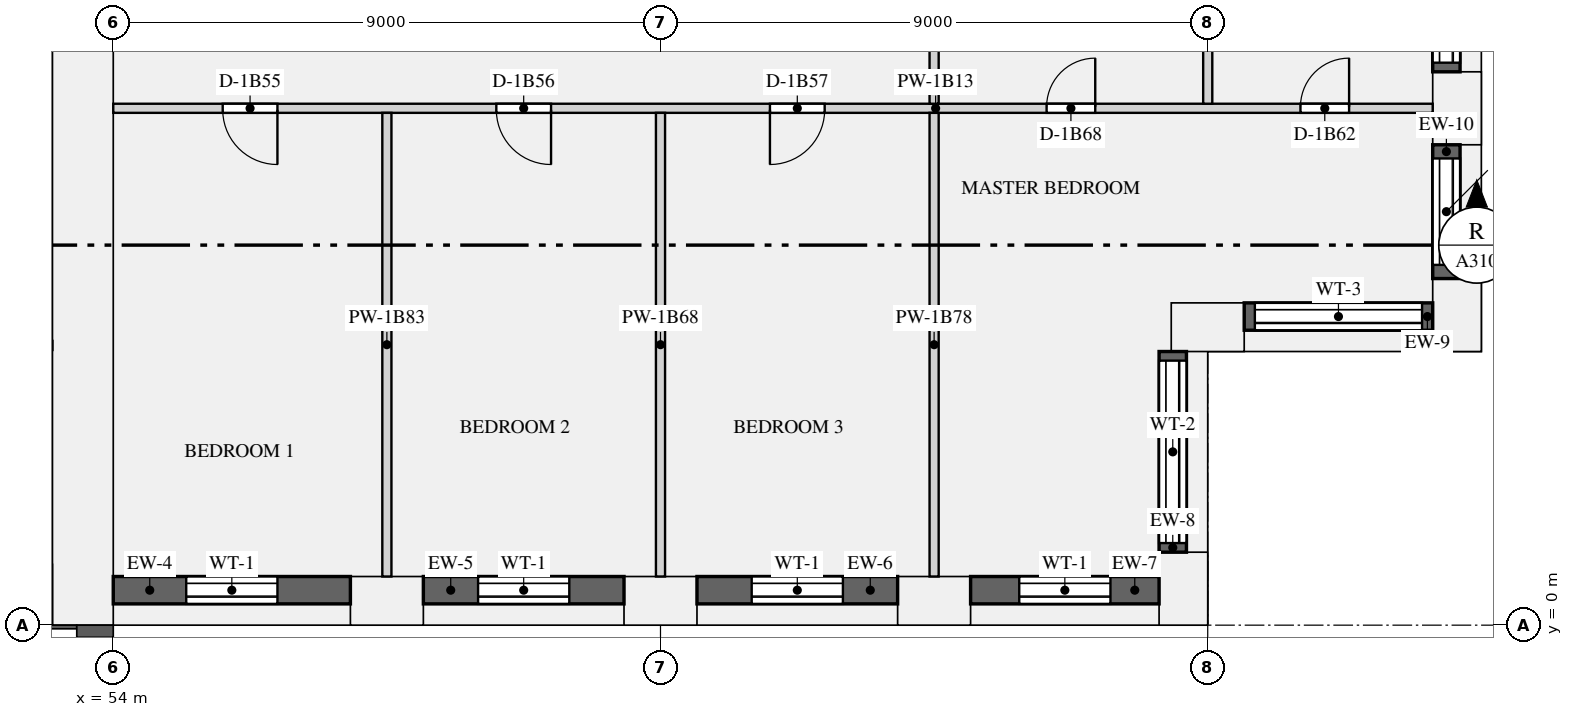
"""IFC4 building model, lengths in metres.
Left out: names, types, materials, properties, quantities, classifications, styles, units other than length and angle.
Written with IfcOpenShell. Run it as: python <this file> out.ifc"""

import sys

from ifc_helpers import new_model, si_unit, direction, frame, frame_2d, origin, origin_2d, place, context, subcontext, project, spatial, rectangle, extrude, element, fill, save


model = new_model("IFC4")
c1 = context("Model", 3, precision=1e-05, world=origin(), true_north=direction((0.0, 1.0)))
c2 = subcontext(c1, "Body", "Model", "MODEL_VIEW")
j1 = project(units=[si_unit("LENGTHUNIT", "METRE"), si_unit("PLANEANGLEUNIT", "RADIAN")], contexts=[c1])
p1 = place(None, origin())
s1 = spatial("IfcSite", under=j1, at=p1, CompositionType="ELEMENT")
p2 = place(p1, origin())
s2 = spatial("IfcBuilding", under=s1, at=p2, CompositionType="ELEMENT")
p3 = place(p2, frame((0.0, 0.0, 28.95)))
s3 = spatial("IfcBuildingStorey", under=s2, at=p3, CompositionType="ELEMENT", Elevation=28.95)
for number, where, z_axis, x_axis in (
    (1, (58.5, 0.4, 0.0), (0.0, 0.0, 1.0), (1.0, 0.0, 0.0)),
    (2, (63.0, 0.4, 0.0), (0.0, 0.0, 1.0), (1.0, 0.0, 0.0)),
    (3, (67.5, 0.4, 0.0), (0.0, 0.0, 1.0), (1.0, 0.0, 0.0)),
    (4, (71.6, 0.6, 0.0), (0.0, 0.0, 1.0), (0.0, 1.0, 0.0)),
    (5, (72.0, 4.9, 0.0), (0.0, 0.0, 1.0), (1.0, 0.0, 0.0)),
    (6, (76.1, 5.1, 0.0), (0.0, 0.0, 1.0), (0.0, 1.0, 0.0)),
    (7, (76.1, 8.5, 0.0), (0.0, 0.0, 1.0), (0.0, 1.0, 0.0)),
):
    element("IfcColumn", number, at=place(p3, frame(where, z_axis=z_axis, x_axis=x_axis)), inside=s3, PredefinedType="USERDEFINED", context=c2, shape_type="SweptSolid", body=[
        extrude(rectangle(XDim=1.2, YDim=0.8, at=origin_2d()), origin(), (0.0, 0.0, 1.0), 3.15),
    ])
p4 = place(p3, frame((53.5, 0.0, 0.0), z_axis=(0.0, 0.0, 1.0), x_axis=(0.0, 1.0, 0.0)))
e8 = element("IfcWall", 8, at=p4, inside=s3, PredefinedType="SHEAR", context=c2, shape_type="SweptSolid", body=[
    extrude(rectangle(XDim=12.5, YDim=1.0, at=frame_2d((6.25, 0.0))), origin(), (0.0, 0.0, 1.0), 3.15),
])
p5 = place(p3, frame((54.0, 0.575, 0.9), z_axis=(0.0, 0.0, 1.0), x_axis=(1.0, 0.0, 0.0)))
e9 = element("IfcWall", 9, at=p5, inside=s3, PredefinedType="SOLIDWALL", context=c2, shape_type="SweptSolid", body=[
    extrude(rectangle(XDim=3.9, YDim=0.45, at=frame_2d((1.95, 0.0))), origin(), (0.0, 0.0, 1.0), 1.93),
])
p6 = place(p5, frame((1.2, 0.0, 0.15)))
e10 = element("IfcOpeningElement", 10, at=p6, cuts=e9, PredefinedType="OPENING", context=c2, shape_type="SweptSolid", body=[
    extrude(rectangle(XDim=1.5, YDim=1.5, at=frame_2d((0.75, 0.75))), frame((0.0, 0.235, 0.0), z_axis=(0.0, -1.0, 0.0), x_axis=(1.0, 0.0, 0.0)), (0.0, 0.0, 1.0), 0.47),
])
p7 = place(p3, frame((59.1, 0.575, 0.9), z_axis=(0.0, 0.0, 1.0), x_axis=(1.0, 0.0, 0.0)))
e11 = element("IfcWall", 11, at=p7, inside=s3, PredefinedType="SOLIDWALL", context=c2, shape_type="SweptSolid", body=[
    extrude(rectangle(XDim=3.3, YDim=0.45, at=frame_2d((1.65, 0.0))), origin(), (0.0, 0.0, 1.0), 1.93),
])
p8 = place(p7, frame((0.9, 0.0, 0.15)))
e12 = element("IfcOpeningElement", 12, at=p8, cuts=e11, PredefinedType="OPENING", context=c2, shape_type="SweptSolid", body=[
    extrude(rectangle(XDim=1.5, YDim=1.5, at=frame_2d((0.75, 0.75))), frame((0.0, 0.235, 0.0), z_axis=(0.0, -1.0, 0.0), x_axis=(1.0, 0.0, 0.0)), (0.0, 0.0, 1.0), 0.47),
])
p9 = place(p3, frame((63.6, 0.575, 0.9), z_axis=(0.0, 0.0, 1.0), x_axis=(1.0, 0.0, 0.0)))
e13 = element("IfcWall", 13, at=p9, inside=s3, PredefinedType="SOLIDWALL", context=c2, shape_type="SweptSolid", body=[
    extrude(rectangle(XDim=3.3, YDim=0.45, at=frame_2d((1.65, 0.0))), origin(), (0.0, 0.0, 1.0), 1.93),
])
p10 = place(p9, frame((0.9, 0.0, 0.15)))
e14 = element("IfcOpeningElement", 14, at=p10, cuts=e13, PredefinedType="OPENING", context=c2, shape_type="SweptSolid", body=[
    extrude(rectangle(XDim=1.5, YDim=1.5, at=frame_2d((0.75, 0.75))), frame((0.0, 0.235, 0.0), z_axis=(0.0, -1.0, 0.0), x_axis=(1.0, 0.0, 0.0)), (0.0, 0.0, 1.0), 0.47),
])
p11 = place(p3, frame((68.1, 0.575, 0.9), z_axis=(0.0, 0.0, 1.0), x_axis=(1.0, 0.0, 0.0)))
e15 = element("IfcWall", 15, at=p11, inside=s3, PredefinedType="SOLIDWALL", context=c2, shape_type="SweptSolid", body=[
    extrude(rectangle(XDim=3.1, YDim=0.45, at=frame_2d((1.55, 0.0))), origin(), (0.0, 0.0, 1.0), 1.93),
])
p12 = place(p11, frame((0.8, 0.0, 0.15)))
e16 = element("IfcOpeningElement", 16, at=p12, cuts=e15, PredefinedType="OPENING", context=c2, shape_type="SweptSolid", body=[
    extrude(rectangle(XDim=1.5, YDim=1.5, at=frame_2d((0.75, 0.75))), frame((0.0, 0.235, 0.0), z_axis=(0.0, -1.0, 0.0), x_axis=(1.0, 0.0, 0.0)), (0.0, 0.0, 1.0), 0.47),
])
p13 = place(p3, frame((71.425, 1.2, 0.9), z_axis=(0.0, 0.0, 1.0), x_axis=(0.0, 1.0, 0.0)))
e17 = element("IfcWall", 17, at=p13, inside=s3, PredefinedType="SOLIDWALL", context=c2, shape_type="SweptSolid", body=[
    extrude(rectangle(XDim=3.3, YDim=0.45, at=frame_2d((1.65, 0.0))), origin(), (0.0, 0.0, 1.0), 1.93),
])
p14 = place(p13, frame((0.15, 0.0, 0.15)))
e18 = element("IfcOpeningElement", 18, at=p14, cuts=e17, PredefinedType="OPENING", context=c2, shape_type="SweptSolid", body=[
    extrude(rectangle(XDim=3.0, YDim=1.5, at=frame_2d((1.5, 0.75))), frame((0.0, 0.235, 0.0), z_axis=(0.0, -1.0, 0.0), x_axis=(1.0, 0.0, 0.0)), (0.0, 0.0, 1.0), 0.47),
])
p15 = place(p3, frame((72.6, 5.075, 0.9), z_axis=(0.0, 0.0, 1.0), x_axis=(1.0, 0.0, 0.0)))
e19 = element("IfcWall", 19, at=p15, inside=s3, PredefinedType="SOLIDWALL", context=c2, shape_type="SweptSolid", body=[
    extrude(rectangle(XDim=3.1, YDim=0.45, at=frame_2d((1.55, 0.0))), origin(), (0.0, 0.0, 1.0), 1.93),
])
p16 = place(p15, frame((0.175, 0.0, 0.15)))
e20 = element("IfcOpeningElement", 20, at=p16, cuts=e19, PredefinedType="OPENING", context=c2, shape_type="SweptSolid", body=[
    extrude(rectangle(XDim=2.75, YDim=1.5, at=frame_2d((1.375, 0.75))), frame((0.0, 0.235, 0.0), z_axis=(0.0, -1.0, 0.0), x_axis=(1.0, 0.0, 0.0)), (0.0, 0.0, 1.0), 0.47),
])
p17 = place(p3, frame((75.925, 5.7, 0.9), z_axis=(0.0, 0.0, 1.0), x_axis=(0.0, 1.0, 0.0)))
e21 = element("IfcWall", 21, at=p17, inside=s3, PredefinedType="SOLIDWALL", context=c2, shape_type="SweptSolid", body=[
    extrude(rectangle(XDim=2.2, YDim=0.45, at=frame_2d((1.1, 0.0))), origin(), (0.0, 0.0, 1.0), 1.93),
])
p18 = place(p17, frame((0.225, 0.0, 0.15)))
e22 = element("IfcOpeningElement", 22, at=p18, cuts=e21, PredefinedType="OPENING", context=c2, shape_type="SweptSolid", body=[
    extrude(rectangle(XDim=1.75, YDim=1.5, at=frame_2d((0.875, 0.75))), frame((0.0, 0.235, 0.0), z_axis=(0.0, -1.0, 0.0), x_axis=(1.0, 0.0, 0.0)), (0.0, 0.0, 1.0), 0.47),
])
p19 = place(p3, frame((75.925, 9.1, 0.9), z_axis=(0.0, 0.0, 1.0), x_axis=(0.0, 1.0, 0.0)))
e23 = element("IfcWall", 23, at=p19, inside=s3, PredefinedType="SOLIDWALL", context=c2, shape_type="SweptSolid", body=[
    extrude(rectangle(XDim=2.8, YDim=0.45, at=frame_2d((1.4, 0.0))), origin(), (0.0, 0.0, 1.0), 1.93),
])
p20 = place(p19, frame((0.15, 0.0, 0.15)))
e24 = element("IfcOpeningElement", 24, at=p20, cuts=e23, PredefinedType="OPENING", context=c2, shape_type="SweptSolid", body=[
    extrude(rectangle(XDim=2.5, YDim=1.5, at=frame_2d((1.25, 0.75))), frame((0.0, 0.235, 0.0), z_axis=(0.0, -1.0, 0.0), x_axis=(1.0, 0.0, 0.0)), (0.0, 0.0, 1.0), 0.47),
])
p21 = place(p3, frame((54.0, 8.5, 0.0), z_axis=(0.0, 0.0, 1.0), x_axis=(1.0, 0.0, 0.0)))
e25 = element("IfcWall", 25, at=p21, inside=s3, PredefinedType="PARTITIONING", context=c2, shape_type="SweptSolid", body=[
    extrude(rectangle(XDim=21.7, YDim=0.15, at=frame_2d((10.85, 0.0))), origin(), (0.0, 0.0, 1.0), 2.83),
])
p22 = place(p21, frame((1.8, 0.0, 0.0)))
e26 = element("IfcOpeningElement", 26, at=p22, cuts=e25, PredefinedType="OPENING", context=c2, shape_type="SweptSolid", body=[
    extrude(rectangle(XDim=0.9, YDim=2.1, at=frame_2d((0.45, 1.05))), frame((0.0, 0.085, 0.0), z_axis=(0.0, -1.0, 0.0), x_axis=(1.0, 0.0, 0.0)), (0.0, 0.0, 1.0), 0.17),
])
p23 = place(p21, frame((6.3, 0.0, 0.0)))
e27 = element("IfcOpeningElement", 27, at=p23, cuts=e25, PredefinedType="OPENING", context=c2, shape_type="SweptSolid", body=[
    extrude(rectangle(XDim=0.9, YDim=2.1, at=frame_2d((0.45, 1.05))), frame((0.0, 0.085, 0.0), z_axis=(0.0, -1.0, 0.0), x_axis=(1.0, 0.0, 0.0)), (0.0, 0.0, 1.0), 0.17),
])
p24 = place(p21, frame((10.8, 0.0, 0.0)))
e28 = element("IfcOpeningElement", 28, at=p24, cuts=e25, PredefinedType="OPENING", context=c2, shape_type="SweptSolid", body=[
    extrude(rectangle(XDim=0.9, YDim=2.1, at=frame_2d((0.45, 1.05))), frame((0.0, 0.085, 0.0), z_axis=(0.0, -1.0, 0.0), x_axis=(1.0, 0.0, 0.0)), (0.0, 0.0, 1.0), 0.17),
])
p25 = place(p21, frame((19.525, 0.0, 0.0)))
e29 = element("IfcOpeningElement", 29, at=p25, cuts=e25, PredefinedType="OPENING", context=c2, shape_type="SweptSolid", body=[
    extrude(rectangle(XDim=0.8, YDim=2.1, at=frame_2d((0.4, 1.05))), frame((0.0, 0.085, 0.0), z_axis=(0.0, -1.0, 0.0), x_axis=(1.0, 0.0, 0.0)), (0.0, 0.0, 1.0), 0.17),
])
p26 = place(p21, frame((15.35, 0.0, 0.0)))
e30 = element("IfcOpeningElement", 30, at=p26, cuts=e25, PredefinedType="OPENING", context=c2, shape_type="SweptSolid", body=[
    extrude(rectangle(XDim=0.8, YDim=2.1, at=frame_2d((0.4, 1.05))), frame((0.0, 0.085, 0.0), z_axis=(0.0, -1.0, 0.0), x_axis=(1.0, 0.0, 0.0)), (0.0, 0.0, 1.0), 0.17),
])
p27 = place(p3, frame((63.0, 0.8, 0.0), z_axis=(0.0, 0.0, 1.0), x_axis=(0.0, 1.0, 0.0)))
e31 = element("IfcWall", 31, at=p27, inside=s3, PredefinedType="PARTITIONING", context=c2, shape_type="SweptSolid", body=[
    extrude(rectangle(XDim=7.625, YDim=0.15, at=frame_2d((3.812, 0.0))), origin(), (0.0, 0.0, 1.0), 2.83),
])
p28 = place(p3, frame((72.0, 8.575, 0.0), z_axis=(0.0, 0.0, 1.0), x_axis=(0.0, 1.0, 0.0)))
e32 = element("IfcWall", 32, at=p28, inside=s3, PredefinedType="PARTITIONING", context=c2, shape_type="SweptSolid", body=[
    extrude(rectangle(XDim=3.85, YDim=0.15, at=frame_2d((1.925, 0.0))), origin(), (0.0, 0.0, 1.0), 2.83),
])
p29 = place(p28, frame((1.15, 0.0, 0.0)))
e33 = element("IfcOpeningElement", 33, at=p29, cuts=e32, PredefinedType="OPENING", context=c2, shape_type="SweptSolid", body=[
    extrude(rectangle(XDim=0.8, YDim=2.1, at=frame_2d((0.4, 1.05))), frame((0.0, 0.085, 0.0), z_axis=(0.0, -1.0, 0.0), x_axis=(1.0, 0.0, 0.0)), (0.0, 0.0, 1.0), 0.17),
])
p30 = place(p3, frame((67.5, 0.8, 0.0), z_axis=(0.0, 0.0, 1.0), x_axis=(0.0, 1.0, 0.0)))
e34 = element("IfcWall", 34, at=p30, inside=s3, PredefinedType="PARTITIONING", context=c2, shape_type="SweptSolid", body=[
    extrude(rectangle(XDim=7.625, YDim=0.15, at=frame_2d((3.812, 0.0))), origin(), (0.0, 0.0, 1.0), 2.83),
])
p31 = place(p3, frame((67.5, 8.575, 0.0), z_axis=(0.0, 0.0, 1.0), x_axis=(0.0, 1.0, 0.0)))
e35 = element("IfcWall", 35, at=p31, inside=s3, PredefinedType="PARTITIONING", context=c2, shape_type="SweptSolid", body=[
    extrude(rectangle(XDim=3.85, YDim=0.15, at=frame_2d((1.925, 0.0))), origin(), (0.0, 0.0, 1.0), 2.83),
])
p32 = place(p31, frame((1.525, 0.0, 0.0)))
e36 = element("IfcOpeningElement", 36, at=p32, cuts=e35, PredefinedType="OPENING", context=c2, shape_type="SweptSolid", body=[
    extrude(rectangle(XDim=0.8, YDim=2.1, at=frame_2d((0.4, 1.05))), frame((0.0, 0.085, 0.0), z_axis=(0.0, -1.0, 0.0), x_axis=(1.0, 0.0, 0.0)), (0.0, 0.0, 1.0), 0.17),
])
p33 = place(p3, frame((58.5, 0.8, 0.0), z_axis=(0.0, 0.0, 1.0), x_axis=(0.0, 1.0, 0.0)))
e37 = element("IfcWall", 37, at=p33, inside=s3, PredefinedType="PARTITIONING", context=c2, shape_type="SweptSolid", body=[
    extrude(rectangle(XDim=7.625, YDim=0.15, at=frame_2d((3.812, 0.0))), origin(), (0.0, 0.0, 1.0), 2.83),
])
p34 = place(p6, origin())
e38 = element("IfcWindow", 38, at=p34, inside=s3, PartitioningType="SINGLE_PANEL", PredefinedType="WINDOW", context=c2, shape_type="SweptSolid", body=[
    extrude(rectangle(XDim=1.5, YDim=1.5, at=frame_2d((0.75, 0.75))), frame((0.0, -0.065, 0.0), z_axis=(0.0, -1.0, 0.0), x_axis=(1.0, 0.0, 0.0)), (0.0, 0.0, 1.0), 0.06),
])
fill(e10, e38)
p35 = place(p8, origin())
e39 = element("IfcWindow", 39, at=p35, inside=s3, PartitioningType="SINGLE_PANEL", PredefinedType="WINDOW", context=c2, shape_type="SweptSolid", body=[
    extrude(rectangle(XDim=1.5, YDim=1.5, at=frame_2d((0.75, 0.75))), frame((0.0, -0.065, 0.0), z_axis=(0.0, -1.0, 0.0), x_axis=(1.0, 0.0, 0.0)), (0.0, 0.0, 1.0), 0.06),
])
fill(e12, e39)
p36 = place(p10, origin())
e40 = element("IfcWindow", 40, at=p36, inside=s3, PartitioningType="SINGLE_PANEL", PredefinedType="WINDOW", context=c2, shape_type="SweptSolid", body=[
    extrude(rectangle(XDim=1.5, YDim=1.5, at=frame_2d((0.75, 0.75))), frame((0.0, -0.065, 0.0), z_axis=(0.0, -1.0, 0.0), x_axis=(1.0, 0.0, 0.0)), (0.0, 0.0, 1.0), 0.06),
])
fill(e14, e40)
p37 = place(p12, origin())
e41 = element("IfcWindow", 41, at=p37, inside=s3, PartitioningType="SINGLE_PANEL", PredefinedType="WINDOW", context=c2, shape_type="SweptSolid", body=[
    extrude(rectangle(XDim=1.5, YDim=1.5, at=frame_2d((0.75, 0.75))), frame((0.0, -0.065, 0.0), z_axis=(0.0, -1.0, 0.0), x_axis=(1.0, 0.0, 0.0)), (0.0, 0.0, 1.0), 0.06),
])
fill(e16, e41)
p38 = place(p14, origin())
e42 = element("IfcWindow", 42, at=p38, inside=s3, PartitioningType="SINGLE_PANEL", PredefinedType="WINDOW", context=c2, shape_type="SweptSolid", body=[
    extrude(rectangle(XDim=3.0, YDim=1.5, at=frame_2d((1.5, 0.75))), frame((0.0, -0.065, 0.0), z_axis=(0.0, -1.0, 0.0), x_axis=(1.0, 0.0, 0.0)), (0.0, 0.0, 1.0), 0.06),
])
fill(e18, e42)
p39 = place(p16, origin())
e43 = element("IfcWindow", 43, at=p39, inside=s3, PartitioningType="SINGLE_PANEL", PredefinedType="WINDOW", context=c2, shape_type="SweptSolid", body=[
    extrude(rectangle(XDim=2.75, YDim=1.5, at=frame_2d((1.375, 0.75))), frame((0.0, -0.065, 0.0), z_axis=(0.0, -1.0, 0.0), x_axis=(1.0, 0.0, 0.0)), (0.0, 0.0, 1.0), 0.06),
])
fill(e20, e43)
p40 = place(p18, origin())
e44 = element("IfcWindow", 44, at=p40, inside=s3, PartitioningType="SINGLE_PANEL", PredefinedType="WINDOW", context=c2, shape_type="SweptSolid", body=[
    extrude(rectangle(XDim=1.75, YDim=1.5, at=frame_2d((0.875, 0.75))), frame((0.0, -0.065, 0.0), z_axis=(0.0, -1.0, 0.0), x_axis=(1.0, 0.0, 0.0)), (0.0, 0.0, 1.0), 0.06),
])
fill(e22, e44)
p41 = place(p20, origin())
e45 = element("IfcWindow", 45, at=p41, inside=s3, PartitioningType="SINGLE_PANEL", PredefinedType="WINDOW", context=c2, shape_type="SweptSolid", body=[
    extrude(rectangle(XDim=2.5, YDim=1.5, at=frame_2d((1.25, 0.75))), frame((0.0, -0.065, 0.0), z_axis=(0.0, -1.0, 0.0), x_axis=(1.0, 0.0, 0.0)), (0.0, 0.0, 1.0), 0.06),
])
fill(e24, e45)
p42 = place(p22, frame((0.9, 0.0, 0.0), z_axis=(0.0, 0.0, 1.0), x_axis=(-1.0, 0.0, 0.0)))
e46 = element("IfcDoor", 46, at=p42, inside=s3, OperationType="SINGLE_SWING_LEFT", PredefinedType="DOOR", context=c2, shape_type="SweptSolid", body=[
    extrude(rectangle(XDim=0.9, YDim=2.1, at=frame_2d((0.45, 1.05))), frame((0.0, 0.025, 0.0), z_axis=(0.0, -1.0, 0.0), x_axis=(1.0, 0.0, 0.0)), (0.0, 0.0, 1.0), 0.05),
])
fill(e26, e46)
p43 = place(p23, frame((0.9, 0.0, 0.0), z_axis=(0.0, 0.0, 1.0), x_axis=(-1.0, 0.0, 0.0)))
e47 = element("IfcDoor", 47, at=p43, inside=s3, OperationType="SINGLE_SWING_LEFT", PredefinedType="DOOR", context=c2, shape_type="SweptSolid", body=[
    extrude(rectangle(XDim=0.9, YDim=2.1, at=frame_2d((0.45, 1.05))), frame((0.0, 0.025, 0.0), z_axis=(0.0, -1.0, 0.0), x_axis=(1.0, 0.0, 0.0)), (0.0, 0.0, 1.0), 0.05),
])
fill(e27, e47)
p44 = place(p24, frame((0.9, 0.0, 0.0), z_axis=(0.0, 0.0, 1.0), x_axis=(-1.0, 0.0, 0.0)))
e48 = element("IfcDoor", 48, at=p44, inside=s3, OperationType="SINGLE_SWING_RIGHT", PredefinedType="DOOR", context=c2, shape_type="SweptSolid", body=[
    extrude(rectangle(XDim=0.9, YDim=2.1, at=frame_2d((0.45, 1.05))), frame((0.0, 0.025, 0.0), z_axis=(0.0, -1.0, 0.0), x_axis=(1.0, 0.0, 0.0)), (0.0, 0.0, 1.0), 0.05),
])
fill(e28, e48)
p45 = place(p25, origin())
e49 = element("IfcDoor", 49, at=p45, inside=s3, OperationType="SINGLE_SWING_RIGHT", PredefinedType="DOOR", context=c2, shape_type="SweptSolid", body=[
    extrude(rectangle(XDim=0.8, YDim=2.1, at=frame_2d((0.4, 1.05))), frame((0.0, 0.025, 0.0), z_axis=(0.0, -1.0, 0.0), x_axis=(1.0, 0.0, 0.0)), (0.0, 0.0, 1.0), 0.05),
])
fill(e29, e49)
p46 = place(p26, origin())
e50 = element("IfcDoor", 50, at=p46, inside=s3, OperationType="SINGLE_SWING_RIGHT", PredefinedType="DOOR", context=c2, shape_type="SweptSolid", body=[
    extrude(rectangle(XDim=0.8, YDim=2.1, at=frame_2d((0.4, 1.05))), frame((0.0, 0.025, 0.0), z_axis=(0.0, -1.0, 0.0), x_axis=(1.0, 0.0, 0.0)), (0.0, 0.0, 1.0), 0.05),
])
fill(e30, e50)
save(model, sys.argv[1])
